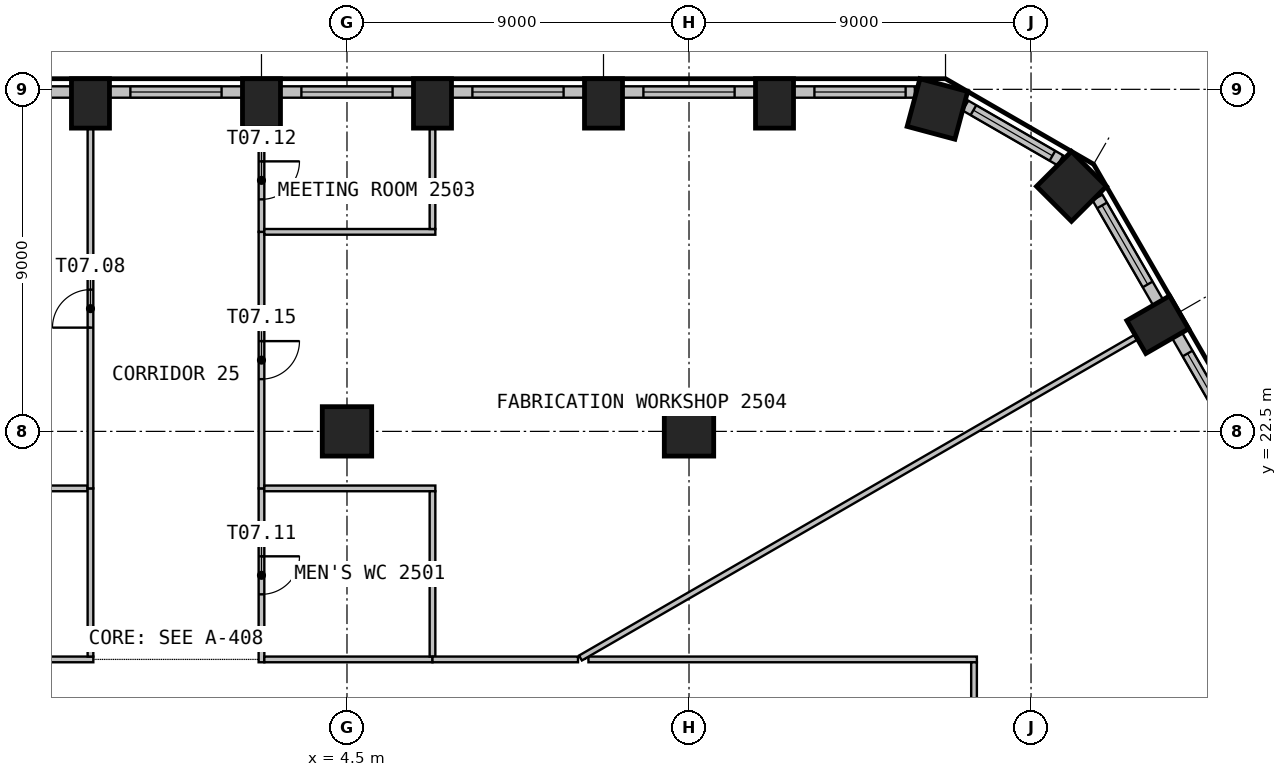
"""IFC4 building model, lengths in metres.
Left out: names, types, materials, properties, quantities, classifications, styles, units other than length and angle.
Written with IfcOpenShell. Run it as: python <this file> out.ifc"""

import sys

from ifc_helpers import new_model, si_unit, direction, frame, frame_2d, origin, origin_2d, place, context, subcontext, project, spatial, rectangle, circle, extrude, element, fill, save


model = new_model("IFC4")
c1 = context("Model", 3, precision=1e-05, world=origin(), true_north=direction((0.0, 1.0)))
c2 = subcontext(c1, "Body", "Model", "MODEL_VIEW")
j1 = project(units=[si_unit("LENGTHUNIT", "METRE"), si_unit("PLANEANGLEUNIT", "RADIAN")], contexts=[c1])
p1 = place(None, origin())
s1 = spatial("IfcSite", under=j1, at=p1, CompositionType="ELEMENT")
p2 = place(p1, origin())
s2 = spatial("IfcBuilding", under=s1, at=p2, CompositionType="ELEMENT")
p3 = place(p2, frame((0.0, 0.0, 104.7)))
s3 = spatial("IfcBuildingStorey", under=s2, at=p3, CompositionType="ELEMENT", Elevation=104.7)
p4 = place(p3, frame((25.834, 25.308, 0.0), z_axis=(0.0, 0.0, 1.0), x_axis=(-0.5, 0.866025403784, 0.0)))
e1 = element("IfcColumn", 1, at=p4, inside=s3, PredefinedType="COLUMN", context=c2, shape_type="SweptSolid", body=[
    extrude(rectangle(XDim=1.0, YDim=1.3, at=origin_2d()), origin(), (0.0, 0.0, 1.0), 3.525),
])
for number, where, z_axis, x_axis in (
    (2, (23.564, 28.947, 0.0), (0.0, 0.0, 1.0), (-0.707, 0.707, 0.0)),
    (3, (20.037, 30.984, 0.0), (0.0, 0.0, 1.0), (-0.966, 0.259, 0.0)),
):
    element("IfcColumn", number, at=place(p3, frame(where, z_axis=z_axis, x_axis=x_axis)), inside=s3, PredefinedType="COLUMN", context=c2, shape_type="SweptSolid", body=[
        extrude(rectangle(XDim=1.3, YDim=1.3, at=origin_2d()), origin(), (0.0, 0.0, 1.0), 3.525),
    ])
for number, where, z_axis, x_axis in (
    (4, (15.75, 31.13, 0.0), (0.0, 0.0, 1.0), (-1.0, 0.0, 0.0)),
    (5, (11.25, 31.13, 0.0), (0.0, 0.0, 1.0), (-1.0, 0.0, 0.0)),
    (6, (6.75, 31.13, 0.0), (0.0, 0.0, 1.0), (-1.0, 0.0, 0.0)),
    (7, (2.25, 31.13, 0.0), (0.0, 0.0, 1.0), (-1.0, 0.0, 0.0)),
    (8, (-2.25, 31.13, 0.0), (0.0, 0.0, 1.0), (-1.0, 0.0, 0.0)),
):
    element("IfcColumn", number, at=place(p3, frame(where, z_axis=z_axis, x_axis=x_axis)), inside=s3, PredefinedType="COLUMN", context=c2, shape_type="SweptSolid", body=[
        extrude(rectangle(XDim=1.0, YDim=1.3, at=origin_2d()), origin(), (0.0, 0.0, 1.0), 3.525),
    ])
for number, where, z_axis, x_axis in (
    (9, (4.5, 22.5, 0.0), (0.0, 0.0, 1.0), (1.0, 0.0, 0.0)),
    (10, (13.5, 22.5, 0.0), (0.0, 0.0, 1.0), (1.0, 0.0, 0.0)),
):
    element("IfcColumn", number, at=place(p3, frame(where, z_axis=z_axis, x_axis=x_axis)), inside=s3, PredefinedType="COLUMN", context=c2, shape_type="SweptSolid", body=[
        extrude(circle(Radius=0.65, at=origin_2d()), origin(), (0.0, 0.0, 1.0), 3.525),
    ])
p5 = place(p3, frame((28.094, 21.994, 0.0), z_axis=(0.0, 0.0, 1.0), x_axis=(-0.499996256241, 0.866027565234, 0.0)))
e11 = element("IfcWall", 11, at=p5, inside=s3, PredefinedType="SOLIDWALL", context=c2, shape_type="SweptSolid", body=[
    extrude(rectangle(XDim=3.499, YDim=0.3, at=frame_2d((1.75, 0.0))), origin(), (0.0, 0.0, 1.0), 3.525),
])
p6 = place(p5, frame((0.55, 0.0, 0.9)))
e12 = element("IfcOpeningElement", 12, at=p6, cuts=e11, PredefinedType="OPENING", context=c2, shape_type="SweptSolid", body=[
    extrude(rectangle(XDim=2.4, YDim=2.1, at=frame_2d((1.2, 1.05))), frame((0.0, 0.16, 0.0), z_axis=(0.0, -1.0, 0.0), x_axis=(1.0, 0.0, 0.0)), (0.0, 0.0, 1.0), 0.32),
])
p7 = place(p3, frame((25.844, 25.891, 0.0), z_axis=(0.0, 0.0, 1.0), x_axis=(-0.500004907028, 0.866022570692, 0.0)))
e13 = element("IfcWall", 13, at=p7, inside=s3, PredefinedType="SOLIDWALL", context=c2, shape_type="SweptSolid", body=[
    extrude(rectangle(XDim=3.192, YDim=0.3, at=frame_2d((1.596, 0.0))), origin(), (0.0, 0.0, 1.0), 3.525),
])
p8 = place(p7, frame((0.55, 0.0, 0.9)))
e14 = element("IfcOpeningElement", 14, at=p8, cuts=e13, PredefinedType="OPENING", context=c2, shape_type="SweptSolid", body=[
    extrude(rectangle(XDim=2.4, YDim=2.1, at=frame_2d((1.2, 1.05))), frame((0.0, 0.16, 0.0), z_axis=(0.0, -1.0, 0.0), x_axis=(1.0, 0.0, 0.0)), (0.0, 0.0, 1.0), 0.32),
])
p9 = place(p3, frame((23.273, 29.63, 0.0), z_axis=(0.0, 0.0, 1.0), x_axis=(-0.866053149362, 0.49995194017, 0.0)))
e15 = element("IfcWall", 15, at=p9, inside=s3, PredefinedType="SOLIDWALL", context=c2, shape_type="SweptSolid", body=[
    extrude(rectangle(XDim=2.885, YDim=0.3, at=frame_2d((1.443, 0.0))), origin(), (0.0, 0.0, 1.0), 3.525),
])
p10 = place(p9, frame((0.243, 0.0, 0.9)))
e16 = element("IfcOpeningElement", 16, at=p10, cuts=e15, PredefinedType="OPENING", context=c2, shape_type="SweptSolid", body=[
    extrude(rectangle(XDim=2.4, YDim=2.1, at=frame_2d((1.2, 1.05))), frame((0.0, 0.16, 0.0), z_axis=(0.0, -1.0, 0.0), x_axis=(1.0, 0.0, 0.0)), (0.0, 0.0, 1.0), 0.32),
])
p11 = place(p3, frame((19.443, 31.43, 0.0), z_axis=(0.0, 0.0, 1.0), x_axis=(-1.0, 0.0, 0.0)))
e17 = element("IfcWall", 17, at=p11, inside=s3, PredefinedType="SOLIDWALL", context=c2, shape_type="SweptSolid", body=[
    extrude(rectangle(XDim=3.192, YDim=0.3, at=frame_2d((1.596, 0.0))), origin(), (0.0, 0.0, 1.0), 3.525),
])
p12 = place(p11, frame((0.243, 0.0, 0.9)))
e18 = element("IfcOpeningElement", 18, at=p12, cuts=e17, PredefinedType="OPENING", context=c2, shape_type="SweptSolid", body=[
    extrude(rectangle(XDim=2.4, YDim=2.1, at=frame_2d((1.2, 1.05))), frame((0.0, 0.16, 0.0), z_axis=(0.0, -1.0, 0.0), x_axis=(1.0, 0.0, 0.0)), (0.0, 0.0, 1.0), 0.32),
])
p13 = place(p3, frame((15.25, 31.43, 0.0), z_axis=(0.0, 0.0, 1.0), x_axis=(-1.0, 0.0, 0.0)))
e19 = element("IfcWall", 19, at=p13, inside=s3, PredefinedType="SOLIDWALL", context=c2, shape_type="SweptSolid", body=[
    extrude(rectangle(XDim=3.499, YDim=0.3, at=frame_2d((1.75, 0.0))), origin(), (0.0, 0.0, 1.0), 3.525),
])
p14 = place(p13, frame((0.55, 0.0, 0.9)))
e20 = element("IfcOpeningElement", 20, at=p14, cuts=e19, PredefinedType="OPENING", context=c2, shape_type="SweptSolid", body=[
    extrude(rectangle(XDim=2.4, YDim=2.1, at=frame_2d((1.2, 1.05))), frame((0.0, 0.16, 0.0), z_axis=(0.0, -1.0, 0.0), x_axis=(1.0, 0.0, 0.0)), (0.0, 0.0, 1.0), 0.32),
])
p15 = place(p3, frame((10.75, 31.43, 0.0), z_axis=(0.0, 0.0, 1.0), x_axis=(-1.0, 0.0, 0.0)))
e21 = element("IfcWall", 21, at=p15, inside=s3, PredefinedType="SOLIDWALL", context=c2, shape_type="SweptSolid", body=[
    extrude(rectangle(XDim=3.499, YDim=0.3, at=frame_2d((1.75, 0.0))), origin(), (0.0, 0.0, 1.0), 3.525),
])
p16 = place(p15, frame((0.55, 0.0, 0.9)))
e22 = element("IfcOpeningElement", 22, at=p16, cuts=e21, PredefinedType="OPENING", context=c2, shape_type="SweptSolid", body=[
    extrude(rectangle(XDim=2.4, YDim=2.1, at=frame_2d((1.2, 1.05))), frame((0.0, 0.16, 0.0), z_axis=(0.0, -1.0, 0.0), x_axis=(1.0, 0.0, 0.0)), (0.0, 0.0, 1.0), 0.32),
])
p17 = place(p3, frame((6.25, 31.43, 0.0), z_axis=(0.0, 0.0, 1.0), x_axis=(-1.0, 0.0, 0.0)))
e23 = element("IfcWall", 23, at=p17, inside=s3, PredefinedType="SOLIDWALL", context=c2, shape_type="SweptSolid", body=[
    extrude(rectangle(XDim=3.499, YDim=0.3, at=frame_2d((1.75, 0.0))), origin(), (0.0, 0.0, 1.0), 3.525),
])
p18 = place(p17, frame((0.55, 0.0, 0.9)))
e24 = element("IfcOpeningElement", 24, at=p18, cuts=e23, PredefinedType="OPENING", context=c2, shape_type="SweptSolid", body=[
    extrude(rectangle(XDim=2.4, YDim=2.1, at=frame_2d((1.2, 1.05))), frame((0.0, 0.16, 0.0), z_axis=(0.0, -1.0, 0.0), x_axis=(1.0, 0.0, 0.0)), (0.0, 0.0, 1.0), 0.32),
])
p19 = place(p3, frame((1.75, 31.43, 0.0), z_axis=(0.0, 0.0, 1.0), x_axis=(-1.0, 0.0, 0.0)))
e25 = element("IfcWall", 25, at=p19, inside=s3, PredefinedType="SOLIDWALL", context=c2, shape_type="SweptSolid", body=[
    extrude(rectangle(XDim=3.499, YDim=0.3, at=frame_2d((1.75, 0.0))), origin(), (0.0, 0.0, 1.0), 3.525),
])
p20 = place(p19, frame((0.55, 0.0, 0.9)))
e26 = element("IfcOpeningElement", 26, at=p20, cuts=e25, PredefinedType="OPENING", context=c2, shape_type="SweptSolid", body=[
    extrude(rectangle(XDim=2.4, YDim=2.1, at=frame_2d((1.2, 1.05))), frame((0.0, 0.16, 0.0), z_axis=(0.0, -1.0, 0.0), x_axis=(1.0, 0.0, 0.0)), (0.0, 0.0, 1.0), 0.32),
])
p21 = place(p3, frame((-2.75, 31.43, 0.0), z_axis=(0.0, 0.0, 1.0), x_axis=(-1.0, 0.0, 0.0)))
e27 = element("IfcWall", 27, at=p21, inside=s3, PredefinedType="SOLIDWALL", context=c2, shape_type="SweptSolid", body=[
    extrude(rectangle(XDim=3.499, YDim=0.3, at=frame_2d((1.75, 0.0))), origin(), (0.0, 0.0, 1.0), 3.525),
])
p22 = place(p21, frame((0.55, 0.0, 0.9)))
e28 = element("IfcOpeningElement", 28, at=p22, cuts=e27, PredefinedType="OPENING", context=c2, shape_type="SweptSolid", body=[
    extrude(rectangle(XDim=2.4, YDim=2.1, at=frame_2d((1.2, 1.05))), frame((0.0, 0.16, 0.0), z_axis=(0.0, -1.0, 0.0), x_axis=(1.0, 0.0, 0.0)), (0.0, 0.0, 1.0), 0.32),
])
p23 = place(p3, frame((-2.175, 16.5, 0.0), z_axis=(0.0, 0.0, 1.0), x_axis=(-1.0, 0.0, 0.0)))
e29 = element("IfcWall", 29, at=p23, inside=s3, PredefinedType="PARTITIONING", context=c2, shape_type="SweptSolid", body=[
    extrude(rectangle(XDim=9.075, YDim=0.15, at=frame_2d((4.538, 0.0))), origin(), (0.0, 0.0, 1.0), 3.525),
])
p24 = place(p23, frame((4.038, 0.0, 0.0)))
e30 = element("IfcOpeningElement", 30, at=p24, cuts=e29, PredefinedType="OPENING", context=c2, shape_type="SweptSolid", body=[
    extrude(rectangle(XDim=1.0, YDim=2.1, at=frame_2d((0.5, 1.05))), frame((0.0, 0.085, 0.0), z_axis=(0.0, -1.0, 0.0), x_axis=(1.0, 0.0, 0.0)), (0.0, 0.0, 1.0), 0.17),
])
p25 = place(p3, frame((-2.325, 21.0, 0.0), z_axis=(0.0, 0.0, 1.0), x_axis=(-1.0, 0.0, 0.0)))
e31 = element("IfcWall", 31, at=p25, inside=s3, PredefinedType="PARTITIONING", context=c2, shape_type="SweptSolid", body=[
    extrude(rectangle(XDim=8.85, YDim=0.15, at=frame_2d((4.425, 0.0))), origin(), (0.0, 0.0, 1.0), 3.525),
])
p26 = place(p3, frame((-2.25, 16.575, 0.0), z_axis=(0.0, 0.0, 1.0), x_axis=(0.0, 1.0, 0.0)))
e32 = element("IfcWall", 32, at=p26, inside=s3, PredefinedType="PARTITIONING", context=c2, shape_type="SweptSolid", body=[
    extrude(rectangle(XDim=4.425, YDim=0.15, at=frame_2d((2.212, 0.0))), origin(), (0.0, 0.0, 1.0), 3.525),
])
p27 = place(p3, frame((-2.25, 21.0, 0.0), z_axis=(0.0, 0.0, 1.0), x_axis=(0.0, 1.0, 0.0)))
e33 = element("IfcWall", 33, at=p27, inside=s3, PredefinedType="PARTITIONING", context=c2, shape_type="SweptSolid", body=[
    extrude(rectangle(XDim=9.46, YDim=0.15, at=frame_2d((4.73, 0.0))), origin(), (0.0, 0.0, 1.0), 3.525),
])
p28 = place(p27, frame((4.23, 0.0, 0.0)))
e34 = element("IfcOpeningElement", 34, at=p28, cuts=e33, PredefinedType="OPENING", context=c2, shape_type="SweptSolid", body=[
    extrude(rectangle(XDim=1.0, YDim=2.1, at=frame_2d((0.5, 1.05))), frame((0.0, 0.085, 0.0), z_axis=(0.0, -1.0, 0.0), x_axis=(1.0, 0.0, 0.0)), (0.0, 0.0, 1.0), 0.17),
])
p29 = place(p3, frame((2.25, 21.0, 0.0), z_axis=(0.0, 0.0, 1.0), x_axis=(0.0, -1.0, 0.0)))
e35 = element("IfcWall", 35, at=p29, inside=s3, PredefinedType="PARTITIONING", context=c2, shape_type="SweptSolid", body=[
    extrude(rectangle(XDim=4.575, YDim=0.15, at=frame_2d((2.288, 0.0))), origin(), (0.0, 0.0, 1.0), 3.525),
])
p30 = place(p29, frame((1.788, 0.0, 0.0)))
e36 = element("IfcOpeningElement", 36, at=p30, cuts=e35, PredefinedType="OPENING", context=c2, shape_type="SweptSolid", body=[
    extrude(rectangle(XDim=1.0, YDim=2.1, at=frame_2d((0.5, 1.05))), frame((0.0, 0.085, 0.0), z_axis=(0.0, -1.0, 0.0), x_axis=(1.0, 0.0, 0.0)), (0.0, 0.0, 1.0), 0.17),
])
p31 = place(p3, frame((6.75, 16.5, 0.0), z_axis=(0.0, 0.0, 1.0), x_axis=(-1.0, 0.0, 0.0)))
e37 = element("IfcWall", 37, at=p31, inside=s3, PredefinedType="PARTITIONING", context=c2, shape_type="SweptSolid", body=[
    extrude(rectangle(XDim=4.425, YDim=0.15, at=frame_2d((2.212, 0.0))), origin(), (0.0, 0.0, 1.0), 3.525),
])
p32 = place(p3, frame((2.25, 27.75, 0.0), z_axis=(0.0, 0.0, 1.0), x_axis=(0.0, -1.0, 0.0)))
e38 = element("IfcWall", 38, at=p32, inside=s3, PredefinedType="PARTITIONING", context=c2, shape_type="SweptSolid", body=[
    extrude(rectangle(XDim=6.75, YDim=0.15, at=frame_2d((3.375, 0.0))), origin(), (0.0, 0.0, 1.0), 3.525),
])
p33 = place(p32, frame((2.875, 0.0, 0.0)))
e39 = element("IfcOpeningElement", 39, at=p33, cuts=e38, PredefinedType="OPENING", context=c2, shape_type="SweptSolid", body=[
    extrude(rectangle(XDim=1.0, YDim=2.1, at=frame_2d((0.5, 1.05))), frame((0.0, 0.085, 0.0), z_axis=(0.0, -1.0, 0.0), x_axis=(1.0, 0.0, 0.0)), (0.0, 0.0, 1.0), 0.17),
])
p34 = place(p3, frame((2.325, 21.0, 0.0), z_axis=(0.0, 0.0, 1.0), x_axis=(1.0, 0.0, 0.0)))
e40 = element("IfcWall", 40, at=p34, inside=s3, PredefinedType="PARTITIONING", context=c2, shape_type="SweptSolid", body=[
    extrude(rectangle(XDim=4.5, YDim=0.15, at=frame_2d((2.25, 0.0))), origin(), (0.0, 0.0, 1.0), 3.525),
])
p35 = place(p3, frame((2.25, 30.46, 0.0), z_axis=(0.0, 0.0, 1.0), x_axis=(0.0, -1.0, 0.0)))
e41 = element("IfcWall", 41, at=p35, inside=s3, PredefinedType="PARTITIONING", context=c2, shape_type="SweptSolid", body=[
    extrude(rectangle(XDim=2.71, YDim=0.15, at=frame_2d((1.355, 0.0))), origin(), (0.0, 0.0, 1.0), 3.525),
])
p36 = place(p35, frame((0.855, 0.0, 0.0)))
e42 = element("IfcOpeningElement", 42, at=p36, cuts=e41, PredefinedType="OPENING", context=c2, shape_type="SweptSolid", body=[
    extrude(rectangle(XDim=1.0, YDim=2.1, at=frame_2d((0.5, 1.05))), frame((0.0, 0.085, 0.0), z_axis=(0.0, -1.0, 0.0), x_axis=(1.0, 0.0, 0.0)), (0.0, 0.0, 1.0), 0.17),
])
p37 = place(p3, frame((6.825, 27.75, 0.0), z_axis=(0.0, 0.0, 1.0), x_axis=(-1.0, 0.0, 0.0)))
e43 = element("IfcWall", 43, at=p37, inside=s3, PredefinedType="PARTITIONING", context=c2, shape_type="SweptSolid", body=[
    extrude(rectangle(XDim=4.5, YDim=0.15, at=frame_2d((2.25, 0.0))), origin(), (0.0, 0.0, 1.0), 3.525),
])
p38 = place(p3, frame((6.75, 20.925, 0.0), z_axis=(0.0, 0.0, 1.0), x_axis=(0.0, -1.0, 0.0)))
e44 = element("IfcWall", 44, at=p38, inside=s3, PredefinedType="PARTITIONING", context=c2, shape_type="SweptSolid", body=[
    extrude(rectangle(XDim=4.35, YDim=0.15, at=frame_2d((2.175, 0.0))), origin(), (0.0, 0.0, 1.0), 3.525),
])
p39 = place(p3, frame((10.579, 16.5, 0.0), z_axis=(0.0, 0.0, 1.0), x_axis=(-1.0, 0.0, 0.0)))
e45 = element("IfcWall", 45, at=p39, inside=s3, PredefinedType="PARTITIONING", context=c2, shape_type="SweptSolid", body=[
    extrude(rectangle(XDim=3.829, YDim=0.15, at=frame_2d((1.915, 0.0))), origin(), (0.0, 0.0, 1.0), 3.525),
])
p40 = place(p3, frame((6.75, 30.46, 0.0), z_axis=(0.0, 0.0, 1.0), x_axis=(0.0, -1.0, 0.0)))
e46 = element("IfcWall", 46, at=p40, inside=s3, PredefinedType="PARTITIONING", context=c2, shape_type="SweptSolid", body=[
    extrude(rectangle(XDim=2.635, YDim=0.15, at=frame_2d((1.317, 0.0))), origin(), (0.0, 0.0, 1.0), 3.525),
])
p41 = place(p3, frame((21.075, 16.5, 0.0), z_axis=(0.0, 0.0, 1.0), x_axis=(-1.0, 0.0, 0.0)))
e47 = element("IfcWall", 47, at=p41, inside=s3, PredefinedType="PARTITIONING", context=c2, shape_type="SweptSolid", body=[
    extrude(rectangle(XDim=10.221, YDim=0.15, at=frame_2d((5.11, 0.0))), origin(), (0.0, 0.0, 1.0), 3.525),
])
p42 = place(p3, frame((25.254, 24.973, 0.0), z_axis=(0.0, 0.0, 1.0), x_axis=(-0.866017851419, -0.500013080853, 0.0)))
e48 = element("IfcWall", 48, at=p42, inside=s3, PredefinedType="PARTITIONING", context=c2, shape_type="SweptSolid", body=[
    extrude(rectangle(XDim=16.87, YDim=0.15, at=frame_2d((8.435, 0.0))), origin(), (0.0, 0.0, 1.0), 3.525),
])
p43 = place(p3, frame((21.0, 2.175, 0.0), z_axis=(0.0, 0.0, 1.0), x_axis=(0.0, 1.0, 0.0)))
e49 = element("IfcWall", 49, at=p43, inside=s3, PredefinedType="PARTITIONING", context=c2, shape_type="SweptSolid", body=[
    extrude(rectangle(XDim=14.25, YDim=0.15, at=frame_2d((7.125, 0.0))), origin(), (0.0, 0.0, 1.0), 3.525),
])
p44 = place(p43, frame((6.625, 0.0, 0.0)))
e50 = element("IfcOpeningElement", 50, at=p44, cuts=e49, PredefinedType="OPENING", context=c2, shape_type="SweptSolid", body=[
    extrude(rectangle(XDim=1.0, YDim=2.1, at=frame_2d((0.5, 1.05))), frame((0.0, 0.085, 0.0), z_axis=(0.0, -1.0, 0.0), x_axis=(1.0, 0.0, 0.0)), (0.0, 0.0, 1.0), 0.17),
])
p45 = place(p6, origin())
e51 = element("IfcWindow", 51, at=p45, inside=s3, PartitioningType="SINGLE_PANEL", PredefinedType="WINDOW", context=c2, shape_type="SweptSolid", body=[
    extrude(rectangle(XDim=2.4, YDim=2.1, at=frame_2d((1.2, 1.05))), frame((0.0, 0.03, 0.0), z_axis=(0.0, -1.0, 0.0), x_axis=(1.0, 0.0, 0.0)), (0.0, 0.0, 1.0), 0.06),
])
fill(e12, e51)
p46 = place(p8, origin())
e52 = element("IfcWindow", 52, at=p46, inside=s3, PartitioningType="SINGLE_PANEL", PredefinedType="WINDOW", context=c2, shape_type="SweptSolid", body=[
    extrude(rectangle(XDim=2.4, YDim=2.1, at=frame_2d((1.2, 1.05))), frame((0.0, 0.03, 0.0), z_axis=(0.0, -1.0, 0.0), x_axis=(1.0, 0.0, 0.0)), (0.0, 0.0, 1.0), 0.06),
])
fill(e14, e52)
p47 = place(p10, origin())
e53 = element("IfcWindow", 53, at=p47, inside=s3, PartitioningType="SINGLE_PANEL", PredefinedType="WINDOW", context=c2, shape_type="SweptSolid", body=[
    extrude(rectangle(XDim=2.4, YDim=2.1, at=frame_2d((1.2, 1.05))), frame((0.0, 0.03, 0.0), z_axis=(0.0, -1.0, 0.0), x_axis=(1.0, 0.0, 0.0)), (0.0, 0.0, 1.0), 0.06),
])
fill(e16, e53)
p48 = place(p12, origin())
e54 = element("IfcWindow", 54, at=p48, inside=s3, PartitioningType="SINGLE_PANEL", PredefinedType="WINDOW", context=c2, shape_type="SweptSolid", body=[
    extrude(rectangle(XDim=2.4, YDim=2.1, at=frame_2d((1.2, 1.05))), frame((0.0, 0.03, 0.0), z_axis=(0.0, -1.0, 0.0), x_axis=(1.0, 0.0, 0.0)), (0.0, 0.0, 1.0), 0.06),
])
fill(e18, e54)
p49 = place(p14, origin())
e55 = element("IfcWindow", 55, at=p49, inside=s3, PartitioningType="SINGLE_PANEL", PredefinedType="WINDOW", context=c2, shape_type="SweptSolid", body=[
    extrude(rectangle(XDim=2.4, YDim=2.1, at=frame_2d((1.2, 1.05))), frame((0.0, 0.03, 0.0), z_axis=(0.0, -1.0, 0.0), x_axis=(1.0, 0.0, 0.0)), (0.0, 0.0, 1.0), 0.06),
])
fill(e20, e55)
p50 = place(p16, origin())
e56 = element("IfcWindow", 56, at=p50, inside=s3, PartitioningType="SINGLE_PANEL", PredefinedType="WINDOW", context=c2, shape_type="SweptSolid", body=[
    extrude(rectangle(XDim=2.4, YDim=2.1, at=frame_2d((1.2, 1.05))), frame((0.0, 0.03, 0.0), z_axis=(0.0, -1.0, 0.0), x_axis=(1.0, 0.0, 0.0)), (0.0, 0.0, 1.0), 0.06),
])
fill(e22, e56)
p51 = place(p18, origin())
e57 = element("IfcWindow", 57, at=p51, inside=s3, PartitioningType="SINGLE_PANEL", PredefinedType="WINDOW", context=c2, shape_type="SweptSolid", body=[
    extrude(rectangle(XDim=2.4, YDim=2.1, at=frame_2d((1.2, 1.05))), frame((0.0, 0.03, 0.0), z_axis=(0.0, -1.0, 0.0), x_axis=(1.0, 0.0, 0.0)), (0.0, 0.0, 1.0), 0.06),
])
fill(e24, e57)
p52 = place(p20, origin())
e58 = element("IfcWindow", 58, at=p52, inside=s3, PartitioningType="SINGLE_PANEL", PredefinedType="WINDOW", context=c2, shape_type="SweptSolid", body=[
    extrude(rectangle(XDim=2.4, YDim=2.1, at=frame_2d((1.2, 1.05))), frame((0.0, 0.03, 0.0), z_axis=(0.0, -1.0, 0.0), x_axis=(1.0, 0.0, 0.0)), (0.0, 0.0, 1.0), 0.06),
])
fill(e26, e58)
p53 = place(p28, origin())
e59 = element("IfcDoor", 59, at=p53, inside=s3, OperationType="SINGLE_SWING_RIGHT", PredefinedType="DOOR", context=c2, shape_type="SweptSolid", body=[
    extrude(rectangle(XDim=1.0, YDim=2.1, at=frame_2d((0.5, 1.05))), frame((0.0, 0.025, 0.0), z_axis=(0.0, -1.0, 0.0), x_axis=(1.0, 0.0, 0.0)), (0.0, 0.0, 1.0), 0.05),
])
fill(e34, e59)
p54 = place(p30, origin())
e60 = element("IfcDoor", 60, at=p54, inside=s3, OperationType="SINGLE_SWING_RIGHT", PredefinedType="DOOR", context=c2, shape_type="SweptSolid", body=[
    extrude(rectangle(XDim=1.0, YDim=2.1, at=frame_2d((0.5, 1.05))), frame((0.0, 0.025, 0.0), z_axis=(0.0, -1.0, 0.0), x_axis=(1.0, 0.0, 0.0)), (0.0, 0.0, 1.0), 0.05),
])
fill(e36, e60)
p55 = place(p36, origin())
e61 = element("IfcDoor", 61, at=p55, inside=s3, OperationType="SINGLE_SWING_LEFT", PredefinedType="DOOR", context=c2, shape_type="SweptSolid", body=[
    extrude(rectangle(XDim=1.0, YDim=2.1, at=frame_2d((0.5, 1.05))), frame((0.0, 0.025, 0.0), z_axis=(0.0, -1.0, 0.0), x_axis=(1.0, 0.0, 0.0)), (0.0, 0.0, 1.0), 0.05),
])
fill(e42, e61)
p56 = place(p33, origin())
e62 = element("IfcDoor", 62, at=p56, inside=s3, OperationType="SINGLE_SWING_RIGHT", PredefinedType="DOOR", context=c2, shape_type="SweptSolid", body=[
    extrude(rectangle(XDim=1.0, YDim=2.1, at=frame_2d((0.5, 1.05))), frame((0.0, 0.025, 0.0), z_axis=(0.0, -1.0, 0.0), x_axis=(1.0, 0.0, 0.0)), (0.0, 0.0, 1.0), 0.05),
])
fill(e39, e62)
save(model, sys.argv[1])
